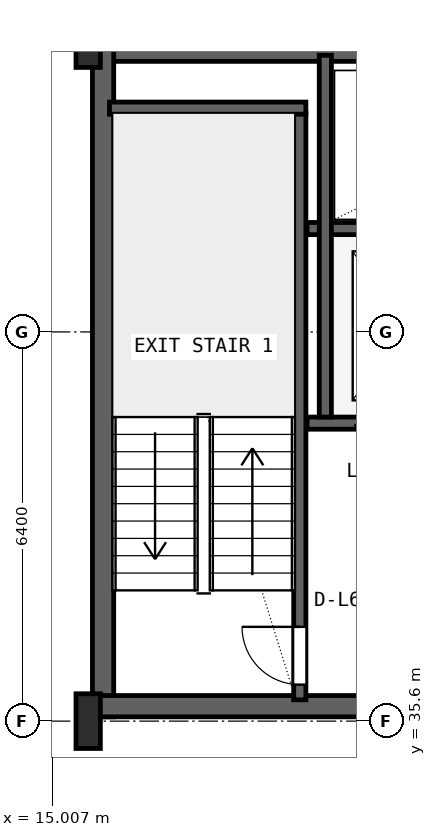
"""IFC4 building model, lengths in metres.
Left out: names, types, materials, properties, quantities, classifications, styles, units other than length and angle.
Written with IfcOpenShell. Run it as: python <this file> out.ifc"""

import sys

from ifc_helpers import new_model, si_unit, direction, frame, frame_2d, origin, origin_2d, place, context, subcontext, project, spatial, rectangle, i_section, extrude, source, transform, mapped, element, fill, save


model = new_model("IFC4")
c1 = context("Model", 3, precision=1e-05, world=origin(), true_north=direction((0.0, 1.0)))
c2 = subcontext(c1, "Body", "Model", "MODEL_VIEW")
j1 = project(units=[si_unit("LENGTHUNIT", "METRE"), si_unit("PLANEANGLEUNIT", "RADIAN")], contexts=[c1])
p1 = place(None, origin())
s1 = spatial("IfcSite", under=j1, at=p1, CompositionType="ELEMENT")
p2 = place(p1, origin())
s2 = spatial("IfcBuilding", under=s1, at=p2, CompositionType="ELEMENT")
p3 = place(p2, frame((0.0, 0.0, 247.0)))
s3 = spatial("IfcBuildingStorey", under=s2, at=p3, CompositionType="ELEMENT", Elevation=247.0)
p4 = place(p3, frame((15.6, 46.625, 0.0), z_axis=(0.0, 0.0, 1.0), x_axis=(1.0, 0.0, 0.0)))
e1 = element("IfcWall", 1, at=p4, inside=s3, PredefinedType="SHEAR", context=c2, shape_type="SweptSolid", body=[
    extrude(rectangle(XDim=36.8, YDim=0.35, at=frame_2d((18.4, 0.0))), origin(), (0.0, 0.0, 1.0), 3.55),
])
p5 = place(p3, frame((15.845, 35.67, 0.0), z_axis=(0.0, 0.0, 1.0), x_axis=(0.0, 1.0, 0.0)))
e2 = element("IfcWall", 2, at=p5, inside=s3, PredefinedType="SHEAR", context=c2, shape_type="SweptSolid", body=[
    extrude(rectangle(XDim=11.13, YDim=0.35, at=frame_2d((5.565, 0.0))), origin(), (0.0, 0.0, 1.0), 3.55),
])
p6 = place(p3, frame((15.67, 35.845, 0.0), z_axis=(0.0, 0.0, 1.0), x_axis=(1.0, 0.0, 0.0)))
e3 = element("IfcWall", 3, at=p6, inside=s3, PredefinedType="SHEAR", context=c2, shape_type="SweptSolid", body=[
    extrude(rectangle(XDim=9.13, YDim=0.35, at=frame_2d((4.565, 0.0))), origin(), (0.0, 0.0, 1.0), 3.55),
])
p7 = place(p6, frame((5.4, 0.0, 0.0)))
e4 = element("IfcOpeningElement", 4, at=p7, cuts=e3, PredefinedType="OPENING", context=c2, shape_type="SweptSolid", body=[
    extrude(rectangle(XDim=1.0, YDim=2.1, at=frame_2d((0.5, 1.05))), frame((0.0, 0.185, 0.0), z_axis=(0.0, -1.0, 0.0), x_axis=(1.0, 0.0, 0.0)), (0.0, 0.0, 1.0), 0.37),
])
m1 = source(origin(), c2, "Body", "SweptSolid", [
    extrude(i_section(OverallWidth=0.4, OverallDepth=0.9, WebThickness=0.016, FlangeThickness=0.028, FilletRadius=0.016, at=origin_2d()), origin(), (0.0, 0.0, 1.0), 3.8),
])
for number, where, z_axis, x_axis in (
    (5, (15.6, 35.6, 0.0), (0.0, 0.0, 1.0), (1.0, 0.0, 0.0)),
    (6, (15.6, 46.8, 0.0), (0.0, 0.0, 1.0), (1.0, 0.0, 0.0)),
):
    element("IfcColumn", number, at=place(p3, frame(where, z_axis=z_axis, x_axis=x_axis)), inside=s3, PredefinedType="COLUMN", context=c2, shape_type="MappedRepresentation", body=[
        mapped(m1, transform((0.0, 0.0, 0.0), x_axis=(1.0, 0.0, 0.0), y_axis=(0.0, 1.0, 0.0), z_axis=(0.0, 0.0, 1.0), scale=1.0)),
    ])
p8 = place(p3, frame((19.08, 35.95, 0.0), z_axis=(0.0, 0.0, 1.0), x_axis=(0.0, 1.0, 0.0)))
e7 = element("IfcWall", 7, at=p8, inside=s3, PredefinedType="SHEAR", context=c2, shape_type="SweptSolid", body=[
    extrude(rectangle(XDim=9.65, YDim=0.2, at=frame_2d((4.825, 0.0))), origin(), (0.0, 0.0, 1.0), 3.55),
])
p9 = place(p8, frame((0.25, 0.0, 0.0)))
e8 = element("IfcOpeningElement", 8, at=p9, cuts=e7, PredefinedType="OPENING", context=c2, shape_type="SweptSolid", body=[
    extrude(rectangle(XDim=0.95, YDim=2.1, at=frame_2d((0.475, 1.05))), frame((0.0, 0.11, 0.0), z_axis=(0.0, -1.0, 0.0), x_axis=(1.0, 0.0, 0.0)), (0.0, 0.0, 1.0), 0.22),
])
p10 = place(p3, frame((15.95, 45.68, 0.0), z_axis=(0.0, 0.0, 1.0), x_axis=(1.0, 0.0, 0.0)))
e9 = element("IfcWall", 9, at=p10, inside=s3, PredefinedType="SHEAR", context=c2, shape_type="SweptSolid", body=[
    extrude(rectangle(XDim=3.23, YDim=0.2, at=frame_2d((1.615, 0.0))), origin(), (0.0, 0.0, 1.0), 3.55),
])
p11 = place(p3, frame((19.2, 40.5, 0.0), z_axis=(0.0, 0.0, 1.0), x_axis=(1.0, 0.0, 0.0)))
e10 = element("IfcWall", 10, at=p11, inside=s3, PredefinedType="SHEAR", context=c2, shape_type="SweptSolid", body=[
    extrude(rectangle(XDim=5.52, YDim=0.2, at=frame_2d((2.76, 0.0))), origin(), (0.0, 0.0, 1.0), 3.55),
])
p12 = place(p11, frame((1.05, 0.0, 0.0)))
e11 = element("IfcOpeningElement", 11, at=p12, cuts=e10, PredefinedType="OPENING", context=c2, shape_type="SweptSolid", body=[
    extrude(rectangle(XDim=1.1, YDim=2.18, at=frame_2d((0.55, 1.09))), frame((0.0, 0.11, 0.0), z_axis=(0.0, -1.0, 0.0), x_axis=(1.0, 0.0, 0.0)), (0.0, 0.0, 1.0), 0.22),
])
p13 = place(p11, frame((3.65, 0.0, 0.0)))
e12 = element("IfcOpeningElement", 12, at=p13, cuts=e10, PredefinedType="OPENING", context=c2, shape_type="SweptSolid", body=[
    extrude(rectangle(XDim=1.1, YDim=2.18, at=frame_2d((0.55, 1.09))), frame((0.0, 0.11, 0.0), z_axis=(0.0, -1.0, 0.0), x_axis=(1.0, 0.0, 0.0)), (0.0, 0.0, 1.0), 0.22),
])
p14 = place(p3, frame((19.2, 43.7, 0.0), z_axis=(0.0, 0.0, 1.0), x_axis=(1.0, 0.0, 0.0)))
e13 = element("IfcWall", 13, at=p14, inside=s3, PredefinedType="SHEAR", context=c2, shape_type="SweptSolid", body=[
    extrude(rectangle(XDim=5.52, YDim=0.2, at=frame_2d((2.76, 0.0))), origin(), (0.0, 0.0, 1.0), 3.55),
])
p15 = place(p3, frame((19.5, 40.6, 0.0), z_axis=(0.0, 0.0, 1.0), x_axis=(0.0, 1.0, 0.0)))
e14 = element("IfcWall", 14, at=p15, inside=s3, PredefinedType="SHEAR", context=c2, shape_type="SweptSolid", body=[
    extrude(rectangle(XDim=5.95, YDim=0.2, at=frame_2d((2.975, 0.0))), origin(), (0.0, 0.0, 1.0), 3.55),
])
m2 = source(origin(), c2, "Body", "SweptSolid", [
    extrude(rectangle(XDim=0.95, YDim=2.1, at=frame_2d((0.475, 1.05))), frame((0.0, 0.025, 0.0), z_axis=(0.0, -1.0, 0.0), x_axis=(1.0, 0.0, 0.0)), (0.0, 0.0, 1.0), 0.05),
])
p16 = place(p9, origin())
e15 = element("IfcDoor", 15, at=p16, inside=s3, OperationType="SINGLE_SWING_RIGHT", PredefinedType="DOOR", context=c2, shape_type="MappedRepresentation", body=[
    mapped(m2, transform((0.0, 0.0, 0.0), x_axis=(1.0, 0.0, 0.0), y_axis=(0.0, 1.0, 0.0), z_axis=(0.0, 0.0, 1.0), scale=1.0)),
])
fill(e8, e15)
save(model, sys.argv[1])
